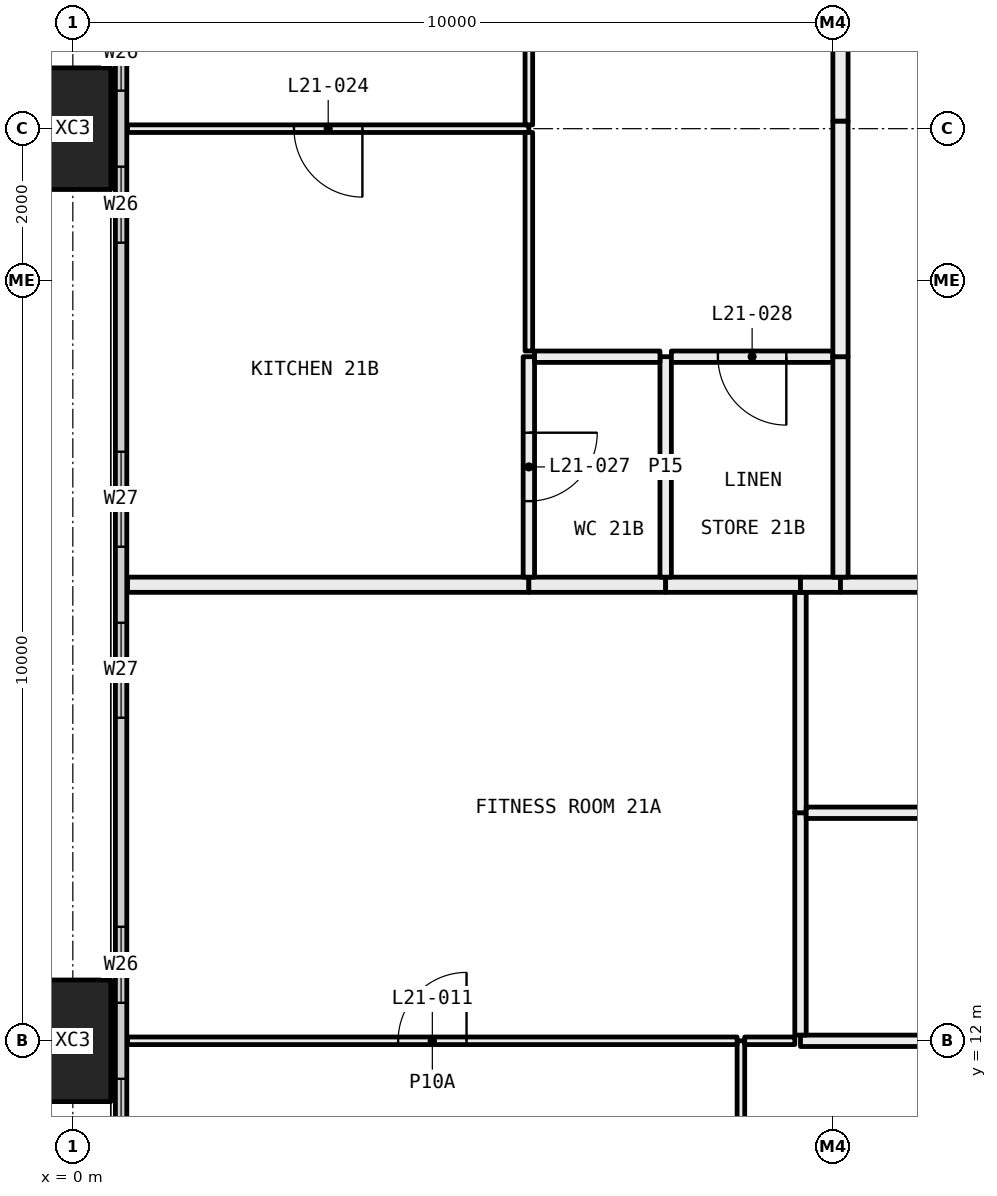
"""IFC4 building model, lengths in metres.
Left out: names, types, materials, properties, quantities, classifications, styles, units other than length and angle.
Written with IfcOpenShell. Run it as: python <this file> out.ifc"""

import sys

from ifc_helpers import new_model, si_unit, direction, frame, frame_2d, origin, origin_2d, place, context, subcontext, project, spatial, rectangle, hollow_rectangle, extrude, element, fill, save


model = new_model("IFC4")
c1 = context("Model", 3, precision=1e-05, world=origin(), true_north=direction((0.0, 1.0)))
c2 = subcontext(c1, "Body", "Model", "MODEL_VIEW")
j1 = project(units=[si_unit("LENGTHUNIT", "METRE"), si_unit("PLANEANGLEUNIT", "RADIAN")], contexts=[c1])
p1 = place(None, origin())
s1 = spatial("IfcSite", under=j1, at=p1, CompositionType="ELEMENT")
p2 = place(p1, origin())
s2 = spatial("IfcBuilding", under=s1, at=p2, CompositionType="ELEMENT")
p3 = place(p2, frame((0.0, 0.0, 85.2)))
s3 = spatial("IfcBuildingStorey", under=s2, at=p3, CompositionType="ELEMENT", Elevation=85.2)
for number, where, z_axis, x_axis in (
    (1, (0.0, 12.0, -0.4), (0.0, 0.0, 1.0), (0.0, 1.0, 0.0)),
    (2, (0.0, 24.0, -0.4), (0.0, 0.0, 1.0), (0.0, 1.0, 0.0)),
):
    element("IfcColumn", number, at=place(p3, frame(where, z_axis=z_axis, x_axis=x_axis)), inside=s3, PredefinedType="COLUMN", context=c2, shape_type="SweptSolid", body=[
        extrude(hollow_rectangle(XDim=1.6, YDim=1.0, WallThickness=0.065, at=origin_2d()), origin(), (0.0, 0.0, 1.0), 3.45),
    ])
p4 = place(p3, frame((0.635, 6.71, 0.0), z_axis=(0.0, 0.0, 1.0), x_axis=(0.0, 1.0, 0.0)))
e3 = element("IfcWall", 3, at=p4, inside=s3, PredefinedType="ELEMENTEDWALL", context=c2, shape_type="SweptSolid", body=[
    extrude(rectangle(XDim=34.58, YDim=0.15, at=frame_2d((17.29, 0.0))), origin(), (0.0, 0.0, 1.0), 3.05),
])
p5 = place(p4, frame((0.29, 0.0, 0.45)))
e4 = element("IfcOpeningElement", 4, at=p5, cuts=e3, PredefinedType="OPENING", context=c2, shape_type="SweptSolid", body=[
    extrude(rectangle(XDim=4.5, YDim=2.55, at=frame_2d((2.25, 1.275))), frame((0.0, 0.085, 0.0), z_axis=(0.0, -1.0, 0.0), x_axis=(1.0, 0.0, 0.0)), (0.0, 0.0, 1.0), 0.17),
])
p6 = place(p4, frame((5.79, 0.0, 0.45)))
e5 = element("IfcOpeningElement", 5, at=p6, cuts=e3, PredefinedType="OPENING", context=c2, shape_type="SweptSolid", body=[
    extrude(rectangle(XDim=1.0, YDim=2.55, at=frame_2d((0.5, 1.275))), frame((0.0, 0.085, 0.0), z_axis=(0.0, -1.0, 0.0), x_axis=(1.0, 0.0, 0.0)), (0.0, 0.0, 1.0), 0.17),
])
p7 = place(p4, frame((9.54, 0.0, 0.45)))
e6 = element("IfcOpeningElement", 6, at=p7, cuts=e3, PredefinedType="OPENING", context=c2, shape_type="SweptSolid", body=[
    extrude(rectangle(XDim=1.25, YDim=2.55, at=frame_2d((0.625, 1.275))), frame((0.0, 0.085, 0.0), z_axis=(0.0, -1.0, 0.0), x_axis=(1.0, 0.0, 0.0)), (0.0, 0.0, 1.0), 0.17),
])
p8 = place(p4, frame((11.79, 0.0, 0.45)))
e7 = element("IfcOpeningElement", 7, at=p8, cuts=e3, PredefinedType="OPENING", context=c2, shape_type="SweptSolid", body=[
    extrude(rectangle(XDim=1.25, YDim=2.55, at=frame_2d((0.625, 1.275))), frame((0.0, 0.085, 0.0), z_axis=(0.0, -1.0, 0.0), x_axis=(1.0, 0.0, 0.0)), (0.0, 0.0, 1.0), 0.17),
])
p9 = place(p4, frame((15.79, 0.0, 0.45)))
e8 = element("IfcOpeningElement", 8, at=p9, cuts=e3, PredefinedType="OPENING", context=c2, shape_type="SweptSolid", body=[
    extrude(rectangle(XDim=1.0, YDim=2.55, at=frame_2d((0.5, 1.275))), frame((0.0, 0.085, 0.0), z_axis=(0.0, -1.0, 0.0), x_axis=(1.0, 0.0, 0.0)), (0.0, 0.0, 1.0), 0.17),
])
p10 = place(p4, frame((17.79, 0.0, 0.45)))
e9 = element("IfcOpeningElement", 9, at=p10, cuts=e3, PredefinedType="OPENING", context=c2, shape_type="SweptSolid", body=[
    extrude(rectangle(XDim=1.0, YDim=2.55, at=frame_2d((0.5, 1.275))), frame((0.0, 0.085, 0.0), z_axis=(0.0, -1.0, 0.0), x_axis=(1.0, 0.0, 0.0)), (0.0, 0.0, 1.0), 0.17),
])
p11 = place(p4, frame((21.54, 0.0, 0.45)))
e10 = element("IfcOpeningElement", 10, at=p11, cuts=e3, PredefinedType="OPENING", context=c2, shape_type="SweptSolid", body=[
    extrude(rectangle(XDim=1.25, YDim=2.55, at=frame_2d((0.625, 1.275))), frame((0.0, 0.085, 0.0), z_axis=(0.0, -1.0, 0.0), x_axis=(1.0, 0.0, 0.0)), (0.0, 0.0, 1.0), 0.17),
])
p12 = place(p4, frame((23.79, 0.0, 0.45)))
e11 = element("IfcOpeningElement", 11, at=p12, cuts=e3, PredefinedType="OPENING", context=c2, shape_type="SweptSolid", body=[
    extrude(rectangle(XDim=1.25, YDim=2.55, at=frame_2d((0.625, 1.275))), frame((0.0, 0.085, 0.0), z_axis=(0.0, -1.0, 0.0), x_axis=(1.0, 0.0, 0.0)), (0.0, 0.0, 1.0), 0.17),
])
p13 = place(p4, frame((27.79, 0.0, 0.45)))
e12 = element("IfcOpeningElement", 12, at=p13, cuts=e3, PredefinedType="OPENING", context=c2, shape_type="SweptSolid", body=[
    extrude(rectangle(XDim=1.0, YDim=2.55, at=frame_2d((0.5, 1.275))), frame((0.0, 0.085, 0.0), z_axis=(0.0, -1.0, 0.0), x_axis=(1.0, 0.0, 0.0)), (0.0, 0.0, 1.0), 0.17),
])
p14 = place(p4, frame((29.79, 0.0, 0.45)))
e13 = element("IfcOpeningElement", 13, at=p14, cuts=e3, PredefinedType="OPENING", context=c2, shape_type="SweptSolid", body=[
    extrude(rectangle(XDim=4.5, YDim=2.55, at=frame_2d((2.25, 1.275))), frame((0.0, 0.085, 0.0), z_axis=(0.0, -1.0, 0.0), x_axis=(1.0, 0.0, 0.0)), (0.0, 0.0, 1.0), 0.17),
])
p15 = place(p3, frame((8.79, 6.05, 0.0), z_axis=(0.0, 0.0, 1.0), x_axis=(0.0, 1.0, 0.0)))
e14 = element("IfcWall", 14, at=p15, inside=s3, PredefinedType="PARTITIONING", context=c2, shape_type="SweptSolid", body=[
    extrude(rectangle(XDim=5.95, YDim=0.1, at=frame_2d((2.975, 0.0))), origin(), (0.0, 0.0, 1.0), 2.45),
])
p16 = place(p15, frame((2.525, 0.0, 0.0)))
e15 = element("IfcOpeningElement", 15, at=p16, cuts=e14, PredefinedType="OPENING", context=c2, shape_type="SweptSolid", body=[
    extrude(rectangle(XDim=0.9, YDim=2.1, at=frame_2d((0.45, 1.05))), frame((0.0, 0.06, 0.0), z_axis=(0.0, -1.0, 0.0), x_axis=(1.0, 0.0, 0.0)), (0.0, 0.0, 1.0), 0.12),
])
p17 = place(p3, frame((8.74, 12.0, 0.0), z_axis=(0.0, 0.0, 1.0), x_axis=(-1.0, 0.0, 0.0)))
e16 = element("IfcWall", 16, at=p17, inside=s3, PredefinedType="PARTITIONING", context=c2, shape_type="SweptSolid", body=[
    extrude(rectangle(XDim=8.02, YDim=0.1, at=frame_2d((4.01, 0.0))), origin(), (0.0, 0.0, 1.0), 2.45),
])
p18 = place(p17, frame((3.56, 0.0, 0.0)))
e17 = element("IfcOpeningElement", 17, at=p18, cuts=e16, PredefinedType="OPENING", context=c2, shape_type="SweptSolid", body=[
    extrude(rectangle(XDim=0.9, YDim=2.1, at=frame_2d((0.45, 1.05))), frame((0.0, 0.06, 0.0), z_axis=(0.0, -1.0, 0.0), x_axis=(1.0, 0.0, 0.0)), (0.0, 0.0, 1.0), 0.12),
])
p19 = place(p3, frame((9.499, 12.0, 0.0), z_axis=(0.0, 0.0, 1.0), x_axis=(-1.0, 0.0, 0.0)))
e18 = element("IfcWall", 18, at=p19, inside=s3, PredefinedType="PARTITIONING", context=c2, shape_type="SweptSolid", body=[
    extrude(rectangle(XDim=0.659, YDim=0.1, at=frame_2d((0.33, 0.0))), origin(), (0.0, 0.0, 1.0), 2.45),
])
p20 = place(p3, frame((11.2, 12.0, 0.0), z_axis=(0.0, 0.0, 1.0), x_axis=(-1.0, 0.0, 0.0)))
e19 = element("IfcWall", 19, at=p20, inside=s3, PredefinedType="PARTITIONING", context=c2, shape_type="SweptSolid", body=[
    extrude(rectangle(XDim=1.626, YDim=0.15, at=frame_2d((0.813, 0.0))), origin(), (0.0, 0.0, 1.0), 2.45),
])
p21 = place(p3, frame((9.574, 12.075, 0.0), z_axis=(0.0, 0.0, 1.0), x_axis=(0.0, 1.0, 0.0)))
e20 = element("IfcWall", 20, at=p21, inside=s3, PredefinedType="PARTITIONING", context=c2, shape_type="SweptSolid", body=[
    extrude(rectangle(XDim=2.925, YDim=0.15, at=frame_2d((1.462, 0.0))), origin(), (0.0, 0.0, 1.0), 2.45),
])
p22 = place(p3, frame((9.574, 15.0, 0.0), z_axis=(0.0, 0.0, 1.0), x_axis=(0.0, 1.0, 0.0)))
e21 = element("IfcWall", 21, at=p22, inside=s3, PredefinedType="PARTITIONING", context=c2, shape_type="SweptSolid", body=[
    extrude(rectangle(XDim=2.9, YDim=0.15, at=frame_2d((1.45, 0.0))), origin(), (0.0, 0.0, 1.0), 3.05),
])
p23 = place(p3, frame((6.0, 18.0, 0.0), z_axis=(0.0, 0.0, 1.0), x_axis=(-1.0, 0.0, 0.0)))
e22 = element("IfcWall", 22, at=p23, inside=s3, PredefinedType="PARTITIONING", context=c2, shape_type="SweptSolid", body=[
    extrude(rectangle(XDim=5.28, YDim=0.2, at=frame_2d((2.64, 0.0))), origin(), (0.0, 0.0, 1.0), 3.05),
])
p24 = place(p3, frame((7.8, 18.0, 0.0), z_axis=(0.0, 0.0, 1.0), x_axis=(-1.0, 0.0, 0.0)))
e23 = element("IfcWall", 23, at=p24, inside=s3, PredefinedType="PARTITIONING", context=c2, shape_type="SweptSolid", body=[
    extrude(rectangle(XDim=1.8, YDim=0.2, at=frame_2d((0.9, 0.0))), origin(), (0.0, 0.0, 1.0), 3.05),
])
p25 = place(p3, frame((9.574, 18.0, 0.0), z_axis=(0.0, 0.0, 1.0), x_axis=(-1.0, 0.0, 0.0)))
e24 = element("IfcWall", 24, at=p25, inside=s3, PredefinedType="PARTITIONING", context=c2, shape_type="SweptSolid", body=[
    extrude(rectangle(XDim=1.774, YDim=0.2, at=frame_2d((0.887, 0.0))), origin(), (0.0, 0.0, 1.0), 3.05),
])
p26 = place(p3, frame((15.0, 15.0, 0.0), z_axis=(0.0, 0.0, 1.0), x_axis=(-1.0, 0.0, 0.0)))
e25 = element("IfcWall", 25, at=p26, inside=s3, PredefinedType="PARTITIONING", context=c2, shape_type="SweptSolid", body=[
    extrude(rectangle(XDim=5.351, YDim=0.15, at=frame_2d((2.676, 0.0))), origin(), (0.0, 0.0, 1.0), 3.05),
])
p27 = place(p3, frame((10.1, 18.0, 0.0), z_axis=(0.0, 0.0, 1.0), x_axis=(-1.0, 0.0, 0.0)))
e26 = element("IfcWall", 26, at=p27, inside=s3, PredefinedType="PARTITIONING", context=c2, shape_type="SweptSolid", body=[
    extrude(rectangle(XDim=0.526, YDim=0.2, at=frame_2d((0.263, 0.0))), origin(), (0.0, 0.0, 1.0), 3.05),
])
p28 = place(p3, frame((15.0, 18.0, 0.0), z_axis=(0.0, 0.0, 1.0), x_axis=(-1.0, 0.0, 0.0)))
e27 = element("IfcWall", 27, at=p28, inside=s3, PredefinedType="PARTITIONING", context=c2, shape_type="SweptSolid", body=[
    extrude(rectangle(XDim=4.9, YDim=0.2, at=frame_2d((2.45, 0.0))), origin(), (0.0, 0.0, 1.0), 3.05),
])
p29 = place(p3, frame((6.0, 24.0, 0.0), z_axis=(0.0, 0.0, 1.0), x_axis=(-1.0, 0.0, 0.0)))
e28 = element("IfcWall", 28, at=p29, inside=s3, PredefinedType="PARTITIONING", context=c2, shape_type="SweptSolid", body=[
    extrude(rectangle(XDim=5.28, YDim=0.1, at=frame_2d((2.64, 0.0))), origin(), (0.0, 0.0, 1.0), 2.45),
])
p30 = place(p29, frame((2.19, 0.0, 0.0)))
e29 = element("IfcOpeningElement", 29, at=p30, cuts=e28, PredefinedType="OPENING", context=c2, shape_type="SweptSolid", body=[
    extrude(rectangle(XDim=0.9, YDim=2.1, at=frame_2d((0.45, 1.05))), frame((0.0, 0.06, 0.0), z_axis=(0.0, -1.0, 0.0), x_axis=(1.0, 0.0, 0.0)), (0.0, 0.0, 1.0), 0.12),
])
p31 = place(p3, frame((6.0, 18.1, 0.0), z_axis=(0.0, 0.0, 1.0), x_axis=(0.0, 1.0, 0.0)))
e30 = element("IfcWall", 30, at=p31, inside=s3, PredefinedType="PARTITIONING", context=c2, shape_type="SweptSolid", body=[
    extrude(rectangle(XDim=2.9, YDim=0.15, at=frame_2d((1.45, 0.0))), origin(), (0.0, 0.0, 1.0), 3.05),
])
p32 = place(p31, frame((1.0, 0.0, 0.0)))
e31 = element("IfcOpeningElement", 31, at=p32, cuts=e30, PredefinedType="OPENING", context=c2, shape_type="SweptSolid", body=[
    extrude(rectangle(XDim=0.9, YDim=2.1, at=frame_2d((0.45, 1.05))), frame((0.0, 0.085, 0.0), z_axis=(0.0, -1.0, 0.0), x_axis=(1.0, 0.0, 0.0)), (0.0, 0.0, 1.0), 0.17),
])
p33 = place(p3, frame((6.0, 21.075, 0.0), z_axis=(0.0, 0.0, 1.0), x_axis=(0.0, 1.0, 0.0)))
e32 = element("IfcWall", 32, at=p33, inside=s3, PredefinedType="PARTITIONING", context=c2, shape_type="SweptSolid", body=[
    extrude(rectangle(XDim=2.875, YDim=0.1, at=frame_2d((1.438, 0.0))), origin(), (0.0, 0.0, 1.0), 2.45),
])
p34 = place(p3, frame((6.0, 24.05, 0.0), z_axis=(0.0, 0.0, 1.0), x_axis=(0.0, 1.0, 0.0)))
e33 = element("IfcWall", 33, at=p34, inside=s3, PredefinedType="PARTITIONING", context=c2, shape_type="SweptSolid", body=[
    extrude(rectangle(XDim=8.95, YDim=0.1, at=frame_2d((4.475, 0.0))), origin(), (0.0, 0.0, 1.0), 2.45),
])
p35 = place(p3, frame((7.8, 18.1, 0.0), z_axis=(0.0, 0.0, 1.0), x_axis=(0.0, 1.0, 0.0)))
e34 = element("IfcWall", 34, at=p35, inside=s3, PredefinedType="PARTITIONING", context=c2, shape_type="SweptSolid", body=[
    extrude(rectangle(XDim=2.9, YDim=0.15, at=frame_2d((1.45, 0.0))), origin(), (0.0, 0.0, 1.0), 3.05),
])
p36 = place(p3, frame((7.725, 21.0, 0.0), z_axis=(0.0, 0.0, 1.0), x_axis=(-1.0, 0.0, 0.0)))
e35 = element("IfcWall", 35, at=p36, inside=s3, PredefinedType="PARTITIONING", context=c2, shape_type="SweptSolid", body=[
    extrude(rectangle(XDim=1.65, YDim=0.15, at=frame_2d((0.825, 0.0))), origin(), (0.0, 0.0, 1.0), 3.05),
])
p37 = place(p3, frame((10.0, 21.0, 0.0), z_axis=(0.0, 0.0, 1.0), x_axis=(-1.0, 0.0, 0.0)))
e36 = element("IfcWall", 36, at=p37, inside=s3, PredefinedType="PARTITIONING", context=c2, shape_type="SweptSolid", body=[
    extrude(rectangle(XDim=2.125, YDim=0.15, at=frame_2d((1.062, 0.0))), origin(), (0.0, 0.0, 1.0), 3.05),
])
p38 = place(p37, frame((0.613, 0.0, 0.0)))
e37 = element("IfcOpeningElement", 37, at=p38, cuts=e36, PredefinedType="OPENING", context=c2, shape_type="SweptSolid", body=[
    extrude(rectangle(XDim=0.9, YDim=2.1, at=frame_2d((0.45, 1.05))), frame((0.0, 0.085, 0.0), z_axis=(0.0, -1.0, 0.0), x_axis=(1.0, 0.0, 0.0)), (0.0, 0.0, 1.0), 0.17),
])
p39 = place(p3, frame((10.1, 18.1, 0.0), z_axis=(0.0, 0.0, 1.0), x_axis=(0.0, 1.0, 0.0)))
e38 = element("IfcWall", 38, at=p39, inside=s3, PredefinedType="PARTITIONING", context=c2, shape_type="SweptSolid", body=[
    extrude(rectangle(XDim=2.9, YDim=0.2, at=frame_2d((1.45, 0.0))), origin(), (0.0, 0.0, 1.0), 3.05),
])
p40 = place(p3, frame((10.1, 21.0, 0.0), z_axis=(0.0, 0.0, 1.0), x_axis=(0.0, 1.0, 0.0)))
e39 = element("IfcWall", 39, at=p40, inside=s3, PredefinedType="PARTITIONING", context=c2, shape_type="SweptSolid", body=[
    extrude(rectangle(XDim=3.1, YDim=0.2, at=frame_2d((1.55, 0.0))), origin(), (0.0, 0.0, 1.0), 2.45),
])
p41 = place(p3, frame((10.1, 24.1, 0.0), z_axis=(0.0, 0.0, 1.0), x_axis=(0.0, 1.0, 0.0)))
e40 = element("IfcWall", 40, at=p41, inside=s3, PredefinedType="PARTITIONING", context=c2, shape_type="SweptSolid", body=[
    extrude(rectangle(XDim=8.9, YDim=0.2, at=frame_2d((4.45, 0.0))), origin(), (0.0, 0.0, 1.0), 3.05),
])
p42 = place(p5, origin())
e41 = element("IfcWindow", 41, at=p42, inside=s3, PartitioningType="SINGLE_PANEL", PredefinedType="WINDOW", context=c2, shape_type="SweptSolid", body=[
    extrude(rectangle(XDim=4.5, YDim=2.55, at=frame_2d((2.25, 1.275))), frame((0.0, 0.03, 0.0), z_axis=(0.0, -1.0, 0.0), x_axis=(1.0, 0.0, 0.0)), (0.0, 0.0, 1.0), 0.06),
])
fill(e4, e41)
p43 = place(p6, origin())
e42 = element("IfcWindow", 42, at=p43, inside=s3, PartitioningType="SINGLE_PANEL", PredefinedType="WINDOW", context=c2, shape_type="SweptSolid", body=[
    extrude(rectangle(XDim=1.0, YDim=2.55, at=frame_2d((0.5, 1.275))), frame((0.0, 0.03, 0.0), z_axis=(0.0, -1.0, 0.0), x_axis=(1.0, 0.0, 0.0)), (0.0, 0.0, 1.0), 0.06),
])
fill(e5, e42)
p44 = place(p7, origin())
e43 = element("IfcWindow", 43, at=p44, inside=s3, PartitioningType="SINGLE_PANEL", PredefinedType="WINDOW", context=c2, shape_type="SweptSolid", body=[
    extrude(rectangle(XDim=1.25, YDim=2.55, at=frame_2d((0.625, 1.275))), frame((0.0, 0.03, 0.0), z_axis=(0.0, -1.0, 0.0), x_axis=(1.0, 0.0, 0.0)), (0.0, 0.0, 1.0), 0.06),
])
fill(e6, e43)
p45 = place(p8, origin())
e44 = element("IfcWindow", 44, at=p45, inside=s3, PartitioningType="SINGLE_PANEL", PredefinedType="WINDOW", context=c2, shape_type="SweptSolid", body=[
    extrude(rectangle(XDim=1.25, YDim=2.55, at=frame_2d((0.625, 1.275))), frame((0.0, 0.03, 0.0), z_axis=(0.0, -1.0, 0.0), x_axis=(1.0, 0.0, 0.0)), (0.0, 0.0, 1.0), 0.06),
])
fill(e7, e44)
p46 = place(p9, origin())
e45 = element("IfcWindow", 45, at=p46, inside=s3, PartitioningType="SINGLE_PANEL", PredefinedType="WINDOW", context=c2, shape_type="SweptSolid", body=[
    extrude(rectangle(XDim=1.0, YDim=2.55, at=frame_2d((0.5, 1.275))), frame((0.0, 0.03, 0.0), z_axis=(0.0, -1.0, 0.0), x_axis=(1.0, 0.0, 0.0)), (0.0, 0.0, 1.0), 0.06),
])
fill(e8, e45)
p47 = place(p10, origin())
e46 = element("IfcWindow", 46, at=p47, inside=s3, PartitioningType="SINGLE_PANEL", PredefinedType="WINDOW", context=c2, shape_type="SweptSolid", body=[
    extrude(rectangle(XDim=1.0, YDim=2.55, at=frame_2d((0.5, 1.275))), frame((0.0, 0.03, 0.0), z_axis=(0.0, -1.0, 0.0), x_axis=(1.0, 0.0, 0.0)), (0.0, 0.0, 1.0), 0.06),
])
fill(e9, e46)
p48 = place(p18, frame((0.9, 0.0, 0.0), x_axis=(-1.0, 0.0, 0.0)))
e47 = element("IfcDoor", 47, at=p48, inside=s3, OperationType="SINGLE_SWING_LEFT", PredefinedType="DOOR", context=c2, shape_type="SweptSolid", body=[
    extrude(rectangle(XDim=0.9, YDim=2.1, at=frame_2d((0.45, 1.05))), frame((0.0, 0.025, 0.0), z_axis=(0.0, -1.0, 0.0), x_axis=(1.0, 0.0, 0.0)), (0.0, 0.0, 1.0), 0.05),
])
fill(e17, e47)
p49 = place(p30, origin())
e48 = element("IfcDoor", 48, at=p49, inside=s3, OperationType="SINGLE_SWING_RIGHT", PredefinedType="DOOR", context=c2, shape_type="SweptSolid", body=[
    extrude(rectangle(XDim=0.9, YDim=2.1, at=frame_2d((0.45, 1.05))), frame((0.0, 0.025, 0.0), z_axis=(0.0, -1.0, 0.0), x_axis=(1.0, 0.0, 0.0)), (0.0, 0.0, 1.0), 0.05),
])
fill(e29, e48)
p50 = place(p32, frame((0.9, 0.0, 0.0), x_axis=(-1.0, 0.0, 0.0)))
e49 = element("IfcDoor", 49, at=p50, inside=s3, OperationType="SINGLE_SWING_RIGHT", PredefinedType="DOOR", context=c2, shape_type="SweptSolid", body=[
    extrude(rectangle(XDim=0.9, YDim=2.1, at=frame_2d((0.45, 1.05))), frame((0.0, 0.025, 0.0), z_axis=(0.0, -1.0, 0.0), x_axis=(1.0, 0.0, 0.0)), (0.0, 0.0, 1.0), 0.05),
])
fill(e31, e49)
p51 = place(p38, origin())
e50 = element("IfcDoor", 50, at=p51, inside=s3, OperationType="SINGLE_SWING_RIGHT", PredefinedType="DOOR", context=c2, shape_type="SweptSolid", body=[
    extrude(rectangle(XDim=0.9, YDim=2.1, at=frame_2d((0.45, 1.05))), frame((0.0, 0.025, 0.0), z_axis=(0.0, -1.0, 0.0), x_axis=(1.0, 0.0, 0.0)), (0.0, 0.0, 1.0), 0.05),
])
fill(e37, e50)
save(model, sys.argv[1])
